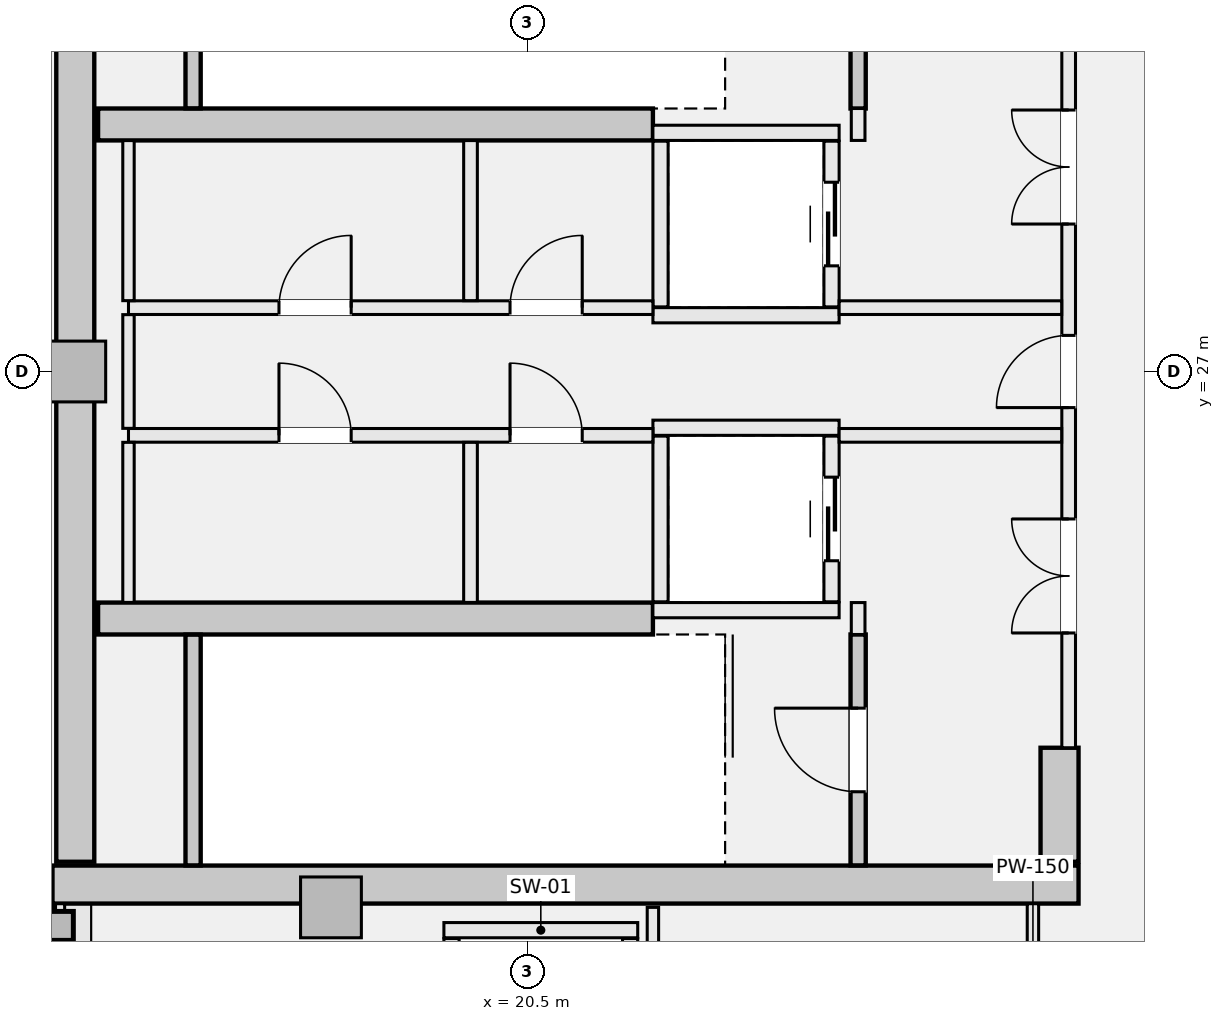
"""IFC4 building model, lengths in metres.
Left out: names, types, materials, properties, quantities, classifications, styles, units other than length and angle.
Written with IfcOpenShell. Run it as: python <this file> out.ifc"""

import sys

from ifc_helpers import new_model, si_unit, direction, frame, frame_2d, origin, origin_2d, place, context, subcontext, project, spatial, rectangle, hollow_rectangle, extrude, element, fill, save


model = new_model("IFC4")
c1 = context("Model", 3, precision=1e-05, world=origin(), true_north=direction((0.0, 1.0)))
c2 = subcontext(c1, "Body", "Model", "MODEL_VIEW")
j1 = project(units=[si_unit("LENGTHUNIT", "METRE"), si_unit("PLANEANGLEUNIT", "RADIAN")], contexts=[c1])
p1 = place(None, origin())
s1 = spatial("IfcSite", under=j1, at=p1, CompositionType="ELEMENT")
p2 = place(p1, origin())
s2 = spatial("IfcBuilding", under=s1, at=p2, CompositionType="ELEMENT")
p3 = place(p2, frame((0.0, 0.0, 281.6)))
s3 = spatial("IfcBuildingStorey", under=s2, at=p3, CompositionType="ELEMENT", Elevation=281.6)
p4 = place(p3, frame((14.25, 20.25, -0.28), z_axis=(0.0, 0.0, 1.0), x_axis=(1.0, 0.0, 0.0)))
e1 = element("IfcWall", 1, at=p4, inside=s3, PredefinedType="SHEAR", context=c2, shape_type="SweptSolid", body=[
    extrude(rectangle(XDim=13.5, YDim=0.5, at=frame_2d((6.75, 0.0))), origin(), (0.0, 0.0, 1.0), 5.78),
])
p5 = place(p3, frame((14.55, 20.55, -0.28), z_axis=(0.0, 0.0, 1.0), x_axis=(0.0, 1.0, 0.0)))
e2 = element("IfcWall", 2, at=p5, inside=s3, PredefinedType="SHEAR", context=c2, shape_type="SweptSolid", body=[
    extrude(rectangle(XDim=12.9, YDim=0.5, at=frame_2d((6.45, 0.0))), origin(), (0.0, 0.0, 1.0), 5.78),
])
p6 = place(p3, frame((27.5, 20.55, -0.28), z_axis=(0.0, 0.0, 1.0), x_axis=(0.0, 1.0, 0.0)))
e3 = element("IfcWall", 3, at=p6, inside=s3, PredefinedType="SHEAR", context=c2, shape_type="SweptSolid", body=[
    extrude(rectangle(XDim=1.5, YDim=0.5, at=frame_2d((0.75, 0.0))), origin(), (0.0, 0.0, 1.0), 5.78),
])
for number, where, z_axis, x_axis in (
    (4, (14.85, 30.25, -0.28), (0.0, 0.0, 1.0), (1.0, 0.0, 0.0)),
    (5, (14.85, 23.75, -0.28), (0.0, 0.0, 1.0), (1.0, 0.0, 0.0)),
):
    element("IfcWall", number, at=place(p3, frame(where, z_axis=z_axis, x_axis=x_axis)), inside=s3, PredefinedType="SHEAR", context=c2, shape_type="SweptSolid", body=[
        extrude(rectangle(XDim=7.3, YDim=0.42, at=frame_2d((3.65, 0.0))), origin(), (0.0, 0.0, 1.0), 5.78),
    ])
p7 = place(p3, frame((14.334, 19.706, -0.28), z_axis=(0.0, 0.0, 1.0), x_axis=(1.0, 0.0, 0.0)))
e6 = element("IfcColumn", 6, at=p7, inside=s3, PredefinedType="COLUMN", context=c2, shape_type="SweptSolid", body=[
    extrude(hollow_rectangle(XDim=0.406, YDim=0.406, WallThickness=0.016, at=origin_2d()), origin(), (0.0, 0.0, 1.0), 5.78),
])
for number, where, z_axis, x_axis in (
    (7, (14.55, 27.0, -0.28), (0.0, 0.0, 1.0), (1.0, 0.0, 0.0)),
    (8, (17.914, 19.95, -0.28), (0.0, 0.0, 1.0), (1.0, 0.0, 0.0)),
):
    element("IfcColumn", number, at=place(p3, frame(where, z_axis=z_axis, x_axis=x_axis)), inside=s3, PredefinedType="PILASTER", context=c2, shape_type="SweptSolid", body=[
        extrude(rectangle(XDim=0.8, YDim=0.8, at=origin_2d()), origin(), (0.0, 0.0, 1.0), 5.78),
    ])
p8 = place(p3, frame((14.334, 19.706, 5.5), z_axis=(0.0, 0.0, 1.0), x_axis=(1.0, 0.0, 0.0)))
e9 = element("IfcColumn", 9, at=p8, inside=s3, PredefinedType="COLUMN", context=c2, shape_type="SweptSolid", body=[
    extrude(hollow_rectangle(XDim=0.356, YDim=0.356, WallThickness=0.016, at=origin_2d()), origin(), (0.0, 0.0, 1.0), 4.2),
])
p9 = place(p3, frame((24.85, 30.46, -0.28), z_axis=(0.0, 0.0, 1.0), x_axis=(0.0, 1.0, 0.0)))
e10 = element("IfcWall", 10, at=p9, inside=s3, PredefinedType="SHEAR", context=c2, shape_type="SweptSolid", body=[
    extrude(rectangle(XDim=3.038, YDim=0.2, at=frame_2d((1.519, 0.0))), origin(), (0.0, 0.0, 1.0), 5.78),
])
p10 = place(p9, frame((0.969, 0.0, 0.28)))
e11 = element("IfcOpeningElement", 11, at=p10, cuts=e10, PredefinedType="OPENING", context=c2, shape_type="SweptSolid", body=[
    extrude(rectangle(XDim=1.1, YDim=2.15, at=frame_2d((0.55, 1.075))), frame((0.0, 0.11, 0.0), z_axis=(0.0, -1.0, 0.0), x_axis=(1.0, 0.0, 0.0)), (0.0, 0.0, 1.0), 0.22),
])
p11 = place(p3, frame((16.1, 30.462, -0.28), z_axis=(0.0, 0.0, 1.0), x_axis=(0.0, 1.0, 0.0)))
e12 = element("IfcWall", 12, at=p11, inside=s3, PredefinedType="SHEAR", context=c2, shape_type="SweptSolid", body=[
    extrude(rectangle(XDim=3.036, YDim=0.2, at=frame_2d((1.518, 0.0))), origin(), (0.0, 0.0, 1.0), 5.78),
])
p12 = place(p3, frame((24.85, 20.502, -0.28), z_axis=(0.0, 0.0, 1.0), x_axis=(0.0, 1.0, 0.0)))
e13 = element("IfcWall", 13, at=p12, inside=s3, PredefinedType="SHEAR", context=c2, shape_type="SweptSolid", body=[
    extrude(rectangle(XDim=3.038, YDim=0.2, at=frame_2d((1.519, 0.0))), origin(), (0.0, 0.0, 1.0), 5.78),
])
p13 = place(p12, frame((0.969, 0.0, 0.28)))
e14 = element("IfcOpeningElement", 14, at=p13, cuts=e13, PredefinedType="OPENING", context=c2, shape_type="SweptSolid", body=[
    extrude(rectangle(XDim=1.1, YDim=2.15, at=frame_2d((0.55, 1.075))), frame((0.0, 0.11, 0.0), z_axis=(0.0, -1.0, 0.0), x_axis=(1.0, 0.0, 0.0)), (0.0, 0.0, 1.0), 0.22),
])
p14 = place(p3, frame((16.1, 20.502, -0.28), z_axis=(0.0, 0.0, 1.0), x_axis=(0.0, 1.0, 0.0)))
e15 = element("IfcWall", 15, at=p14, inside=s3, PredefinedType="SHEAR", context=c2, shape_type="SweptSolid", body=[
    extrude(rectangle(XDim=3.036, YDim=0.2, at=frame_2d((1.518, 0.0))), origin(), (0.0, 0.0, 1.0), 5.78),
])
for number, where, z_axis, x_axis in (
    (16, (22.15, 30.14, 0.0), (0.0, 0.0, 1.0), (1.0, 0.0, 0.0)),
    (17, (22.15, 27.74, 0.0), (0.0, 0.0, 1.0), (1.0, 0.0, 0.0)),
):
    element("IfcWall", number, at=place(p3, frame(where, z_axis=z_axis, x_axis=x_axis)), inside=s3, PredefinedType="SOLIDWALL", context=c2, shape_type="SweptSolid", body=[
        extrude(rectangle(XDim=2.45, YDim=0.2, at=frame_2d((1.225, 0.0))), origin(), (0.0, 0.0, 1.0), 5.5),
    ])
p15 = place(p3, frame((22.25, 27.85, 0.0), z_axis=(0.0, 0.0, 1.0), x_axis=(0.0, 1.0, 0.0)))
e18 = element("IfcWall", 18, at=p15, inside=s3, PredefinedType="SOLIDWALL", context=c2, shape_type="SweptSolid", body=[
    extrude(rectangle(XDim=2.18, YDim=0.2, at=frame_2d((1.09, 0.0))), origin(), (0.0, 0.0, 1.0), 5.5),
])
p16 = place(p3, frame((24.5, 27.85, 0.0), z_axis=(0.0, 0.0, 1.0), x_axis=(0.0, 1.0, 0.0)))
e19 = element("IfcWall", 19, at=p16, inside=s3, PredefinedType="SOLIDWALL", context=c2, shape_type="SweptSolid", body=[
    extrude(rectangle(XDim=2.18, YDim=0.2, at=frame_2d((1.09, 0.0))), origin(), (0.0, 0.0, 1.0), 5.5),
])
p17 = place(p16, frame((0.54, 0.0, 0.0)))
e20 = element("IfcOpeningElement", 20, at=p17, cuts=e19, PredefinedType="OPENING", context=c2, shape_type="SweptSolid", body=[
    extrude(rectangle(XDim=1.1, YDim=2.2, at=frame_2d((0.55, 1.1))), frame((0.0, 0.11, 0.0), z_axis=(0.0, -1.0, 0.0), x_axis=(1.0, 0.0, 0.0)), (0.0, 0.0, 1.0), 0.22),
])
for number, where, z_axis, x_axis in (
    (21, (22.15, 26.26, 0.0), (0.0, 0.0, 1.0), (1.0, 0.0, 0.0)),
    (22, (22.15, 23.86, 0.0), (0.0, 0.0, 1.0), (1.0, 0.0, 0.0)),
):
    element("IfcWall", number, at=place(p3, frame(where, z_axis=z_axis, x_axis=x_axis)), inside=s3, PredefinedType="SOLIDWALL", context=c2, shape_type="SweptSolid", body=[
        extrude(rectangle(XDim=2.45, YDim=0.2, at=frame_2d((1.225, 0.0))), origin(), (0.0, 0.0, 1.0), 5.5),
    ])
p18 = place(p3, frame((22.25, 23.97, 0.0), z_axis=(0.0, 0.0, 1.0), x_axis=(0.0, 1.0, 0.0)))
e23 = element("IfcWall", 23, at=p18, inside=s3, PredefinedType="SOLIDWALL", context=c2, shape_type="SweptSolid", body=[
    extrude(rectangle(XDim=2.18, YDim=0.2, at=frame_2d((1.09, 0.0))), origin(), (0.0, 0.0, 1.0), 5.5),
])
p19 = place(p3, frame((24.5, 23.97, 0.0), z_axis=(0.0, 0.0, 1.0), x_axis=(0.0, 1.0, 0.0)))
e24 = element("IfcWall", 24, at=p19, inside=s3, PredefinedType="SOLIDWALL", context=c2, shape_type="SweptSolid", body=[
    extrude(rectangle(XDim=2.18, YDim=0.2, at=frame_2d((1.09, 0.0))), origin(), (0.0, 0.0, 1.0), 5.5),
])
p20 = place(p19, frame((0.54, 0.0, 0.0)))
e25 = element("IfcOpeningElement", 25, at=p20, cuts=e24, PredefinedType="OPENING", context=c2, shape_type="SweptSolid", body=[
    extrude(rectangle(XDim=1.1, YDim=2.2, at=frame_2d((0.55, 1.1))), frame((0.0, 0.11, 0.0), z_axis=(0.0, -1.0, 0.0), x_axis=(1.0, 0.0, 0.0)), (0.0, 0.0, 1.0), 0.22),
])
p21 = place(p3, frame((19.4, 19.65, 0.0), z_axis=(0.0, 0.0, 1.0), x_axis=(1.0, 0.0, 0.0)))
e26 = element("IfcWall", 26, at=p21, inside=s3, PredefinedType="SOLIDWALL", context=c2, shape_type="SweptSolid", body=[
    extrude(rectangle(XDim=2.55, YDim=0.2, at=frame_2d((1.275, 0.0))), origin(), (0.0, 0.0, 1.0), 5.5),
])
for number, where, z_axis, x_axis in (
    (27, (19.5, 17.01, 0.0), (0.0, 0.0, 1.0), (0.0, 1.0, 0.0)),
    (28, (21.85, 17.01, 0.0), (0.0, 0.0, 1.0), (0.0, 1.0, 0.0)),
):
    element("IfcWall", number, at=place(p3, frame(where, z_axis=z_axis, x_axis=x_axis)), inside=s3, PredefinedType="SOLIDWALL", context=c2, shape_type="SweptSolid", body=[
        extrude(rectangle(XDim=2.53, YDim=0.2, at=frame_2d((1.265, 0.0))), origin(), (0.0, 0.0, 1.0), 5.5),
    ])
for number, where, z_axis, x_axis in (
    (29, (24.85, 23.54, 0.0), (0.0, 0.0, 1.0), (0.0, 1.0, 0.0)),
    (30, (24.85, 30.04, 0.0), (0.0, 0.0, 1.0), (0.0, 1.0, 0.0)),
):
    element("IfcWall", number, at=place(p3, frame(where, z_axis=z_axis, x_axis=x_axis)), inside=s3, PredefinedType="SOLIDWALL", context=c2, shape_type="SweptSolid", body=[
        extrude(rectangle(XDim=0.42, YDim=0.18, at=frame_2d((0.21, 0.0))), origin(), (0.0, 0.0, 1.0), 5.5),
    ])
p22 = place(p3, frame((27.62, 22.05, 0.0), z_axis=(0.0, 0.0, 1.0), x_axis=(0.0, 1.0, 0.0)))
e31 = element("IfcWall", 31, at=p22, inside=s3, PredefinedType="SOLIDWALL", context=c2, shape_type="SweptSolid", body=[
    extrude(rectangle(XDim=9.9, YDim=0.18, at=frame_2d((4.95, 0.0))), origin(), (0.0, 0.0, 1.0), 4.592),
])
p23 = place(p22, frame((4.475, 0.0, 0.0)))
e32 = element("IfcOpeningElement", 32, at=p23, cuts=e31, PredefinedType="OPENING", context=c2, shape_type="SweptSolid", body=[
    extrude(rectangle(XDim=0.95, YDim=2.1, at=frame_2d((0.475, 1.05))), frame((0.0, 0.1, 0.0), z_axis=(0.0, -1.0, 0.0), x_axis=(1.0, 0.0, 0.0)), (0.0, 0.0, 1.0), 0.2),
])
p24 = place(p22, frame((6.89, 0.0, 0.0)))
e33 = element("IfcOpeningElement", 33, at=p24, cuts=e31, PredefinedType="OPENING", context=c2, shape_type="SweptSolid", body=[
    extrude(rectangle(XDim=1.5, YDim=2.2, at=frame_2d((0.75, 1.1))), frame((0.0, 0.1, 0.0), z_axis=(0.0, -1.0, 0.0), x_axis=(1.0, 0.0, 0.0)), (0.0, 0.0, 1.0), 0.2),
])
p25 = place(p22, frame((1.51, 0.0, 0.0)))
e34 = element("IfcOpeningElement", 34, at=p25, cuts=e31, PredefinedType="OPENING", context=c2, shape_type="SweptSolid", body=[
    extrude(rectangle(XDim=1.5, YDim=2.2, at=frame_2d((0.75, 1.1))), frame((0.0, 0.1, 0.0), z_axis=(0.0, -1.0, 0.0), x_axis=(1.0, 0.0, 0.0)), (0.0, 0.0, 1.0), 0.2),
])
p26 = place(p3, frame((15.25, 27.84, 0.0), z_axis=(0.0, 0.0, 1.0), x_axis=(1.0, 0.0, 0.0)))
e35 = element("IfcWall", 35, at=p26, inside=s3, PredefinedType="SOLIDWALL", context=c2, shape_type="SweptSolid", body=[
    extrude(rectangle(XDim=6.9, YDim=0.18, at=frame_2d((3.45, 0.0))), origin(), (0.0, 0.0, 1.0), 5.5),
])
p27 = place(p26, frame((5.02, 0.0, 0.0)))
e36 = element("IfcOpeningElement", 36, at=p27, cuts=e35, PredefinedType="OPENING", context=c2, shape_type="SweptSolid", body=[
    extrude(rectangle(XDim=0.95, YDim=2.1, at=frame_2d((0.475, 1.05))), frame((0.0, 0.1, 0.0), z_axis=(0.0, -1.0, 0.0), x_axis=(1.0, 0.0, 0.0)), (0.0, 0.0, 1.0), 0.2),
])
p28 = place(p26, frame((1.98, 0.0, 0.0)))
e37 = element("IfcOpeningElement", 37, at=p28, cuts=e35, PredefinedType="OPENING", context=c2, shape_type="SweptSolid", body=[
    extrude(rectangle(XDim=0.95, YDim=2.1, at=frame_2d((0.475, 1.05))), frame((0.0, 0.1, 0.0), z_axis=(0.0, -1.0, 0.0), x_axis=(1.0, 0.0, 0.0)), (0.0, 0.0, 1.0), 0.2),
])
p29 = place(p3, frame((24.6, 27.84, 0.0), z_axis=(0.0, 0.0, 1.0), x_axis=(1.0, 0.0, 0.0)))
e38 = element("IfcWall", 38, at=p29, inside=s3, PredefinedType="SOLIDWALL", context=c2, shape_type="SweptSolid", body=[
    extrude(rectangle(XDim=2.928, YDim=0.18, at=frame_2d((1.464, 0.0))), origin(), (0.0, 0.0, 1.0), 5.5),
])
p30 = place(p3, frame((15.25, 26.16, 0.0), z_axis=(0.0, 0.0, 1.0), x_axis=(1.0, 0.0, 0.0)))
e39 = element("IfcWall", 39, at=p30, inside=s3, PredefinedType="SOLIDWALL", context=c2, shape_type="SweptSolid", body=[
    extrude(rectangle(XDim=6.9, YDim=0.18, at=frame_2d((3.45, 0.0))), origin(), (0.0, 0.0, 1.0), 5.5),
])
p31 = place(p30, frame((5.02, 0.0, 0.0)))
e40 = element("IfcOpeningElement", 40, at=p31, cuts=e39, PredefinedType="OPENING", context=c2, shape_type="SweptSolid", body=[
    extrude(rectangle(XDim=0.95, YDim=2.1, at=frame_2d((0.475, 1.05))), frame((0.0, 0.1, 0.0), z_axis=(0.0, -1.0, 0.0), x_axis=(1.0, 0.0, 0.0)), (0.0, 0.0, 1.0), 0.2),
])
p32 = place(p30, frame((1.98, 0.0, 0.0)))
e41 = element("IfcOpeningElement", 41, at=p32, cuts=e39, PredefinedType="OPENING", context=c2, shape_type="SweptSolid", body=[
    extrude(rectangle(XDim=0.95, YDim=2.1, at=frame_2d((0.475, 1.05))), frame((0.0, 0.1, 0.0), z_axis=(0.0, -1.0, 0.0), x_axis=(1.0, 0.0, 0.0)), (0.0, 0.0, 1.0), 0.2),
])
p33 = place(p3, frame((24.6, 26.16, 0.0), z_axis=(0.0, 0.0, 1.0), x_axis=(1.0, 0.0, 0.0)))
e42 = element("IfcWall", 42, at=p33, inside=s3, PredefinedType="SOLIDWALL", context=c2, shape_type="SweptSolid", body=[
    extrude(rectangle(XDim=2.928, YDim=0.18, at=frame_2d((1.464, 0.0))), origin(), (0.0, 0.0, 1.0), 5.5),
])
p34 = place(p3, frame((15.25, 23.962, 0.0), z_axis=(0.0, 0.0, 1.0), x_axis=(0.0, 1.0, 0.0)))
e43 = element("IfcWall", 43, at=p34, inside=s3, PredefinedType="PARTITIONING", context=c2, shape_type="SweptSolid", body=[
    extrude(rectangle(XDim=2.106, YDim=0.15, at=frame_2d((1.053, 0.0))), origin(), (0.0, 0.0, 1.0), 5.5),
])
p35 = place(p3, frame((15.25, 26.252, 0.0), z_axis=(0.0, 0.0, 1.0), x_axis=(0.0, 1.0, 0.0)))
e44 = element("IfcWall", 44, at=p35, inside=s3, PredefinedType="PARTITIONING", context=c2, shape_type="SweptSolid", body=[
    extrude(rectangle(XDim=1.496, YDim=0.15, at=frame_2d((0.748, 0.0))), origin(), (0.0, 0.0, 1.0), 5.5),
])
p36 = place(p3, frame((15.25, 27.932, 0.0), z_axis=(0.0, 0.0, 1.0), x_axis=(0.0, 1.0, 0.0)))
e45 = element("IfcWall", 45, at=p36, inside=s3, PredefinedType="PARTITIONING", context=c2, shape_type="SweptSolid", body=[
    extrude(rectangle(XDim=2.106, YDim=0.15, at=frame_2d((1.053, 0.0))), origin(), (0.0, 0.0, 1.0), 5.5),
])
for number, where, z_axis, x_axis in (
    (46, (19.75, 23.962, 0.0), (0.0, 0.0, 1.0), (0.0, 1.0, 0.0)),
    (47, (19.75, 27.932, 0.0), (0.0, 0.0, 1.0), (0.0, 1.0, 0.0)),
):
    element("IfcWall", number, at=place(p3, frame(where, z_axis=z_axis, x_axis=x_axis)), inside=s3, PredefinedType="SOLIDWALL", context=c2, shape_type="SweptSolid", body=[
        extrude(rectangle(XDim=2.106, YDim=0.18, at=frame_2d((1.053, 0.0))), origin(), (0.0, 0.0, 1.0), 5.5),
    ])
p37 = place(p3, frame((22.15, 17.127, 0.0), z_axis=(0.0, 0.0, 1.0), x_axis=(0.0, 1.0, 0.0)))
e48 = element("IfcWall", 48, at=p37, inside=s3, PredefinedType="PARTITIONING", context=c2, shape_type="SweptSolid", body=[
    extrude(rectangle(XDim=2.823, YDim=0.15, at=frame_2d((1.412, 0.0))), origin(), (0.0, 0.0, 1.0), 5.5),
])
p38 = place(p3, frame((27.15, 17.127, 0.0), z_axis=(0.0, 0.0, 1.0), x_axis=(0.0, 1.0, 0.0)))
e49 = element("IfcWall", 49, at=p38, inside=s3, PredefinedType="PARTITIONING", context=c2, shape_type="SweptSolid", body=[
    extrude(rectangle(XDim=2.871, YDim=0.15, at=frame_2d((1.436, 0.0))), origin(), (0.0, 0.0, 1.0), 5.5),
])
p39 = place(p38, frame((0.96, 0.0, 0.0)))
e50 = element("IfcOpeningElement", 50, at=p39, cuts=e49, PredefinedType="OPENING", context=c2, shape_type="SweptSolid", body=[
    extrude(rectangle(XDim=0.95, YDim=2.1, at=frame_2d((0.475, 1.05))), frame((0.0, 0.085, 0.0), z_axis=(0.0, -1.0, 0.0), x_axis=(1.0, 0.0, 0.0)), (0.0, 0.0, 1.0), 0.17),
])
p40 = place(p3, frame((11.154, 27.0, 0.0), z_axis=(0.0, 0.0, 1.0), x_axis=(1.0, 0.0, 0.0)))
e51 = element("IfcWall", 51, at=p40, inside=s3, PredefinedType="PARTITIONING", context=c2, shape_type="SweptSolid", body=[
    extrude(rectangle(XDim=3.144, YDim=0.12, at=frame_2d((1.572, 0.0))), origin(), (0.0, 0.0, 1.0), 4.292),
])
p41 = place(p3, frame((14.35, 19.112, 0.0), z_axis=(0.0, 0.0, 1.0), x_axis=(0.0, 1.0, 0.0)))
e52 = element("IfcWall", 52, at=p41, inside=s3, PredefinedType="PARTITIONING", context=c2, shape_type="SweptSolid", body=[
    extrude(rectangle(XDim=0.886, YDim=0.12, at=frame_2d((0.443, 0.0))), origin(), (0.0, 0.0, 1.0), 4.292),
])
p42 = place(p13, origin())
e53 = element("IfcDoor", 53, at=p42, inside=s3, OperationType="SINGLE_SWING_RIGHT", PredefinedType="DOOR", context=c2, shape_type="SweptSolid", body=[
    extrude(rectangle(XDim=1.1, YDim=2.15, at=frame_2d((0.55, 1.075))), frame((0.0, 0.025, 0.0), z_axis=(0.0, -1.0, 0.0), x_axis=(1.0, 0.0, 0.0)), (0.0, 0.0, 1.0), 0.05),
])
fill(e14, e53)
p43 = place(p17, origin())
e54 = element("IfcDoor", 54, at=p43, inside=s3, OperationType="SLIDING_TO_LEFT", PredefinedType="DOOR", context=c2, shape_type="SweptSolid", body=[
    extrude(rectangle(XDim=1.1, YDim=2.2, at=frame_2d((0.55, 1.1))), frame((0.0, 0.025, 0.0), z_axis=(0.0, -1.0, 0.0), x_axis=(1.0, 0.0, 0.0)), (0.0, 0.0, 1.0), 0.05),
])
fill(e20, e54)
p44 = place(p20, origin())
e55 = element("IfcDoor", 55, at=p44, inside=s3, OperationType="SLIDING_TO_LEFT", PredefinedType="DOOR", context=c2, shape_type="SweptSolid", body=[
    extrude(rectangle(XDim=1.1, YDim=2.2, at=frame_2d((0.55, 1.1))), frame((0.0, 0.025, 0.0), z_axis=(0.0, -1.0, 0.0), x_axis=(1.0, 0.0, 0.0)), (0.0, 0.0, 1.0), 0.05),
])
fill(e25, e55)
p45 = place(p23, origin())
e56 = element("IfcDoor", 56, at=p45, inside=s3, OperationType="SINGLE_SWING_LEFT", PredefinedType="DOOR", context=c2, shape_type="SweptSolid", body=[
    extrude(rectangle(XDim=0.95, YDim=2.1, at=frame_2d((0.475, 1.05))), frame((0.0, 0.025, 0.0), z_axis=(0.0, -1.0, 0.0), x_axis=(1.0, 0.0, 0.0)), (0.0, 0.0, 1.0), 0.05),
])
fill(e32, e56)
p46 = place(p24, origin())
e57 = element("IfcDoor", 57, at=p46, inside=s3, OperationType="DOUBLE_DOOR_SINGLE_SWING", PredefinedType="DOOR", context=c2, shape_type="SweptSolid", body=[
    extrude(rectangle(XDim=1.5, YDim=2.2, at=frame_2d((0.75, 1.1))), frame((0.0, 0.025, 0.0), z_axis=(0.0, -1.0, 0.0), x_axis=(1.0, 0.0, 0.0)), (0.0, 0.0, 1.0), 0.05),
])
fill(e33, e57)
p47 = place(p25, origin())
e58 = element("IfcDoor", 58, at=p47, inside=s3, OperationType="DOUBLE_DOOR_SINGLE_SWING", PredefinedType="DOOR", context=c2, shape_type="SweptSolid", body=[
    extrude(rectangle(XDim=1.5, YDim=2.2, at=frame_2d((0.75, 1.1))), frame((0.0, 0.025, 0.0), z_axis=(0.0, -1.0, 0.0), x_axis=(1.0, 0.0, 0.0)), (0.0, 0.0, 1.0), 0.05),
])
fill(e34, e58)
p48 = place(p27, origin())
e59 = element("IfcDoor", 59, at=p48, inside=s3, OperationType="SINGLE_SWING_RIGHT", PredefinedType="DOOR", context=c2, shape_type="SweptSolid", body=[
    extrude(rectangle(XDim=0.95, YDim=2.1, at=frame_2d((0.475, 1.05))), frame((0.0, 0.025, 0.0), z_axis=(0.0, -1.0, 0.0), x_axis=(1.0, 0.0, 0.0)), (0.0, 0.0, 1.0), 0.05),
])
fill(e36, e59)
p49 = place(p31, origin())
e60 = element("IfcDoor", 60, at=p49, inside=s3, OperationType="SINGLE_SWING_LEFT", PredefinedType="DOOR", context=c2, shape_type="SweptSolid", body=[
    extrude(rectangle(XDim=0.95, YDim=2.1, at=frame_2d((0.475, 1.05))), frame((0.0, 0.025, 0.0), z_axis=(0.0, -1.0, 0.0), x_axis=(1.0, 0.0, 0.0)), (0.0, 0.0, 1.0), 0.05),
])
fill(e40, e60)
p50 = place(p28, origin())
e61 = element("IfcDoor", 61, at=p50, inside=s3, OperationType="SINGLE_SWING_RIGHT", PredefinedType="DOOR", context=c2, shape_type="SweptSolid", body=[
    extrude(rectangle(XDim=0.95, YDim=2.1, at=frame_2d((0.475, 1.05))), frame((0.0, 0.025, 0.0), z_axis=(0.0, -1.0, 0.0), x_axis=(1.0, 0.0, 0.0)), (0.0, 0.0, 1.0), 0.05),
])
fill(e37, e61)
p51 = place(p32, origin())
e62 = element("IfcDoor", 62, at=p51, inside=s3, OperationType="SINGLE_SWING_LEFT", PredefinedType="DOOR", context=c2, shape_type="SweptSolid", body=[
    extrude(rectangle(XDim=0.95, YDim=2.1, at=frame_2d((0.475, 1.05))), frame((0.0, 0.025, 0.0), z_axis=(0.0, -1.0, 0.0), x_axis=(1.0, 0.0, 0.0)), (0.0, 0.0, 1.0), 0.05),
])
fill(e41, e62)
save(model, sys.argv[1])
